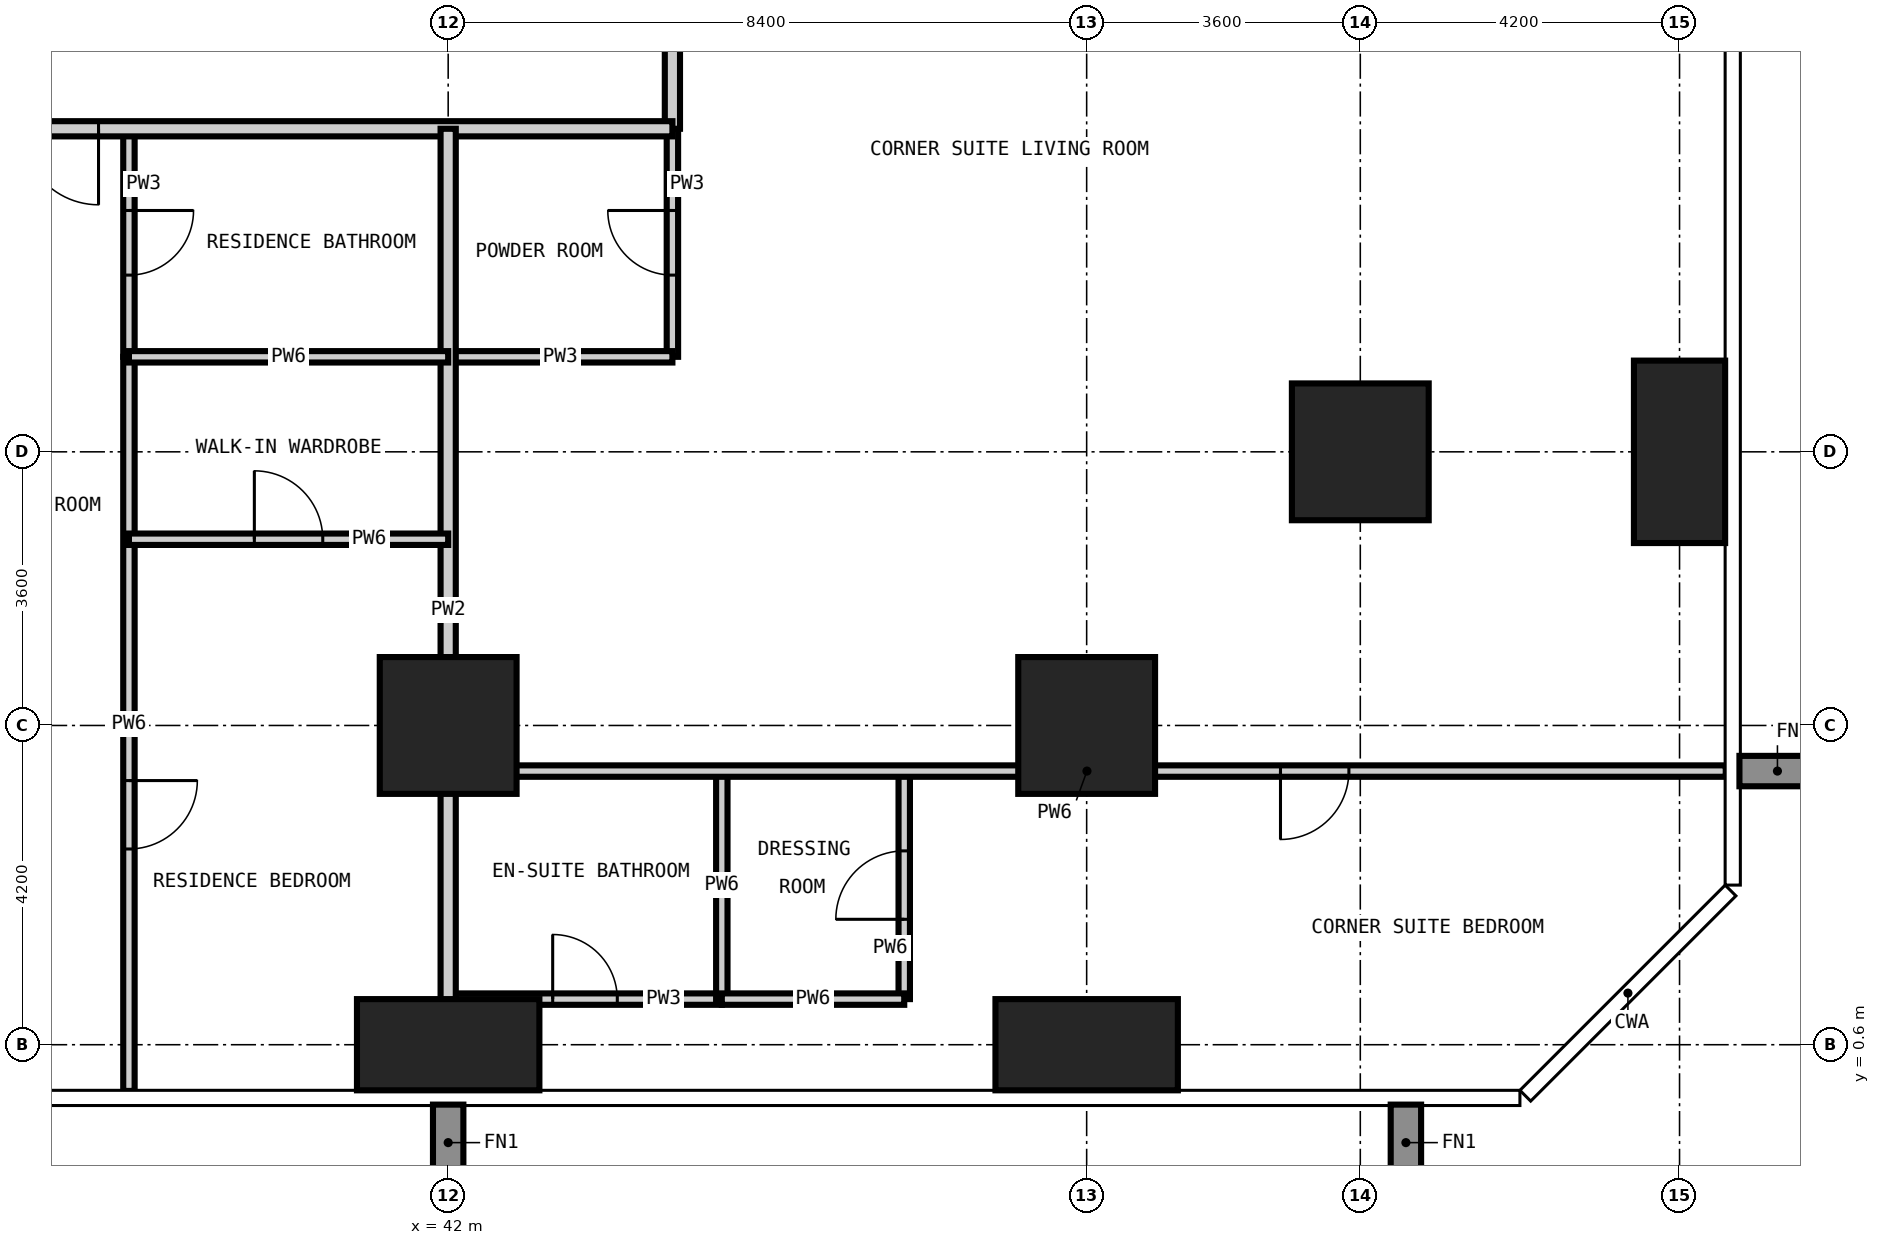
"""IFC4 building model, lengths in metres.
Left out: names, types, materials, properties, quantities, classifications, styles, units other than length and angle.
Written with IfcOpenShell. Run it as: python <this file> out.ifc"""

import sys

from ifc_helpers import new_model, si_unit, direction, frame, frame_2d, origin, origin_2d, place, context, subcontext, project, spatial, rectangle, extrude, element, fill, save


model = new_model("IFC4")
c1 = context("Model", 3, precision=1e-05, world=origin(), true_north=direction((0.0, 1.0)))
c2 = subcontext(c1, "Body", "Model", "MODEL_VIEW")
j1 = project(units=[si_unit("LENGTHUNIT", "METRE"), si_unit("PLANEANGLEUNIT", "RADIAN")], contexts=[c1])
p1 = place(None, origin())
s1 = spatial("IfcSite", under=j1, at=p1, CompositionType="ELEMENT")
p2 = place(p1, origin())
s2 = spatial("IfcBuilding", under=s1, at=p2, CompositionType="ELEMENT")
p3 = place(p2, frame((0.0, 0.0, 52.2)))
s3 = spatial("IfcBuildingStorey", under=s2, at=p3, CompositionType="ELEMENT", Elevation=52.2)
p4 = place(p3, frame((42.0, 0.6, -0.35), z_axis=(0.0, 0.0, 1.0), x_axis=(1.0, 0.0, 0.0)))
e1 = element("IfcColumn", 1, at=p4, inside=s3, PredefinedType="COLUMN", context=c2, shape_type="SweptSolid", body=[
    extrude(rectangle(XDim=2.4, YDim=1.2, at=origin_2d()), origin(), (0.0, 0.0, 1.0), 3.6),
])
p5 = place(p3, frame((42.0, 4.8, -0.35), z_axis=(0.0, 0.0, 1.0), x_axis=(1.0, 0.0, 0.0)))
e2 = element("IfcColumn", 2, at=p5, inside=s3, PredefinedType="COLUMN", context=c2, shape_type="SweptSolid", body=[
    extrude(rectangle(XDim=1.8, YDim=1.8, at=origin_2d()), origin(), (0.0, 0.0, 1.0), 3.6),
])
p6 = place(p3, frame((50.4, 0.6, -0.35), z_axis=(0.0, 0.0, 1.0), x_axis=(1.0, 0.0, 0.0)))
e3 = element("IfcColumn", 3, at=p6, inside=s3, PredefinedType="COLUMN", context=c2, shape_type="SweptSolid", body=[
    extrude(rectangle(XDim=2.4, YDim=1.2, at=origin_2d()), origin(), (0.0, 0.0, 1.0), 3.6),
])
for number, where, z_axis, x_axis in (
    (4, (50.4, 4.8, -0.35), (0.0, 0.0, 1.0), (1.0, 0.0, 0.0)),
    (5, (54.0, 8.4, -0.35), (0.0, 0.0, 1.0), (1.0, 0.0, 0.0)),
):
    element("IfcColumn", number, at=place(p3, frame(where, z_axis=z_axis, x_axis=x_axis)), inside=s3, PredefinedType="COLUMN", context=c2, shape_type="SweptSolid", body=[
        extrude(rectangle(XDim=1.8, YDim=1.8, at=origin_2d()), origin(), (0.0, 0.0, 1.0), 3.6),
    ])
p7 = place(p3, frame((58.2, 8.4, -0.35), z_axis=(0.0, 0.0, 1.0), x_axis=(1.0, 0.0, 0.0)))
e6 = element("IfcColumn", 6, at=p7, inside=s3, PredefinedType="COLUMN", context=c2, shape_type="SweptSolid", body=[
    extrude(rectangle(XDim=1.2, YDim=2.4, at=origin_2d()), origin(), (0.0, 0.0, 1.0), 3.6),
])
p8 = place(p3, frame((37.8, 9.65, 0.0), z_axis=(0.0, 0.0, 1.0), x_axis=(0.0, 1.0, 0.0)))
e7 = element("IfcWall", 7, at=p8, inside=s3, PredefinedType="PARTITIONING", context=c2, shape_type="SweptSolid", body=[
    extrude(rectangle(XDim=3.0, YDim=0.15, at=frame_2d((1.5, 0.0))), origin(), (0.0, 0.0, 1.0), 3.25),
])
p9 = place(p8, frame((1.075, 0.0, 0.0)))
e8 = element("IfcOpeningElement", 8, at=p9, cuts=e7, PredefinedType="OPENING", context=c2, shape_type="SweptSolid", body=[
    extrude(rectangle(XDim=0.85, YDim=2.1, at=frame_2d((0.425, 1.05))), frame((0.0, 0.085, 0.0), z_axis=(0.0, -1.0, 0.0), x_axis=(1.0, 0.0, 0.0)), (0.0, 0.0, 1.0), 0.17),
])
p10 = place(p3, frame((44.95, 9.65, 0.0), z_axis=(0.0, 0.0, 1.0), x_axis=(0.0, 1.0, 0.0)))
e9 = element("IfcWall", 9, at=p10, inside=s3, PredefinedType="PARTITIONING", context=c2, shape_type="SweptSolid", body=[
    extrude(rectangle(XDim=3.0, YDim=0.15, at=frame_2d((1.5, 0.0))), origin(), (0.0, 0.0, 1.0), 3.25),
])
p11 = place(p10, frame((1.075, 0.0, 0.0)))
e10 = element("IfcOpeningElement", 10, at=p11, cuts=e9, PredefinedType="OPENING", context=c2, shape_type="SweptSolid", body=[
    extrude(rectangle(XDim=0.85, YDim=2.1, at=frame_2d((0.425, 1.05))), frame((0.0, 0.085, 0.0), z_axis=(0.0, -1.0, 0.0), x_axis=(1.0, 0.0, 0.0)), (0.0, 0.0, 1.0), 0.17),
])
p12 = place(p3, frame((42.0, 1.2, 0.0), z_axis=(0.0, 0.0, 1.0), x_axis=(1.0, 0.0, 0.0)))
e11 = element("IfcWall", 11, at=p12, inside=s3, PredefinedType="PARTITIONING", context=c2, shape_type="SweptSolid", body=[
    extrude(rectangle(XDim=3.6, YDim=0.15, at=frame_2d((1.8, 0.0))), origin(), (0.0, 0.0, 1.0), 3.25),
])
p13 = place(p12, frame((1.375, 0.0, 0.0)))
e12 = element("IfcOpeningElement", 12, at=p13, cuts=e11, PredefinedType="OPENING", context=c2, shape_type="SweptSolid", body=[
    extrude(rectangle(XDim=0.85, YDim=2.1, at=frame_2d((0.425, 1.05))), frame((0.0, 0.085, 0.0), z_axis=(0.0, -1.0, 0.0), x_axis=(1.0, 0.0, 0.0)), (0.0, 0.0, 1.0), 0.17),
])
p14 = place(p3, frame((42.0, 9.65, 0.0), z_axis=(0.0, 0.0, 1.0), x_axis=(1.0, 0.0, 0.0)))
e13 = element("IfcWall", 13, at=p14, inside=s3, PredefinedType="PARTITIONING", context=c2, shape_type="SweptSolid", body=[
    extrude(rectangle(XDim=2.95, YDim=0.15, at=frame_2d((1.475, 0.0))), origin(), (0.0, 0.0, 1.0), 3.25),
])
p15 = place(p3, frame((44.95, 45.55, 0.0), z_axis=(0.0, 0.0, 1.0), x_axis=(0.0, -1.0, 0.0)))
e14 = element("IfcWall", 14, at=p15, inside=s3, PredefinedType="PARTITIONING", context=c2, shape_type="SweptSolid", body=[
    extrude(rectangle(XDim=32.9, YDim=0.2, at=frame_2d((16.45, 0.0))), origin(), (0.0, 0.0, 1.0), 3.25),
])
p16 = place(p15, frame((24.8, 0.0, 0.0)))
e15 = element("IfcOpeningElement", 15, at=p16, cuts=e14, PredefinedType="OPENING", context=c2, shape_type="SweptSolid", body=[
    extrude(rectangle(XDim=1.0, YDim=2.2, at=frame_2d((0.5, 1.1))), frame((0.0, 0.11, 0.0), z_axis=(0.0, -1.0, 0.0), x_axis=(1.0, 0.0, 0.0)), (0.0, 0.0, 1.0), 0.22),
])
p17 = place(p15, frame((19.85, 0.0, 0.0)))
e16 = element("IfcOpeningElement", 16, at=p17, cuts=e14, PredefinedType="OPENING", context=c2, shape_type="SweptSolid", body=[
    extrude(rectangle(XDim=1.0, YDim=2.2, at=frame_2d((0.5, 1.1))), frame((0.0, 0.11, 0.0), z_axis=(0.0, -1.0, 0.0), x_axis=(1.0, 0.0, 0.0)), (0.0, 0.0, 1.0), 0.22),
])
p18 = place(p15, frame((11.45, 0.0, 0.0)))
e17 = element("IfcOpeningElement", 17, at=p18, cuts=e14, PredefinedType="OPENING", context=c2, shape_type="SweptSolid", body=[
    extrude(rectangle(XDim=1.0, YDim=2.2, at=frame_2d((0.5, 1.1))), frame((0.0, 0.11, 0.0), z_axis=(0.0, -1.0, 0.0), x_axis=(1.0, 0.0, 0.0)), (0.0, 0.0, 1.0), 0.22),
])
p19 = place(p15, frame((6.5, 0.0, 0.0)))
e18 = element("IfcOpeningElement", 18, at=p19, cuts=e14, PredefinedType="OPENING", context=c2, shape_type="SweptSolid", body=[
    extrude(rectangle(XDim=1.0, YDim=2.2, at=frame_2d((0.5, 1.1))), frame((0.0, 0.11, 0.0), z_axis=(0.0, -1.0, 0.0), x_axis=(1.0, 0.0, 0.0)), (0.0, 0.0, 1.0), 0.22),
])
p20 = place(p15, frame((30.325, 0.0, 0.0)))
e19 = element("IfcOpeningElement", 19, at=p20, cuts=e14, PredefinedType="OPENING", context=c2, shape_type="SweptSolid", body=[
    extrude(rectangle(XDim=1.0, YDim=2.2, at=frame_2d((0.5, 1.1))), frame((0.0, 0.11, 0.0), z_axis=(0.0, -1.0, 0.0), x_axis=(1.0, 0.0, 0.0)), (0.0, 0.0, 1.0), 0.22),
])
p21 = place(p15, frame((1.275, 0.0, 0.0)))
e20 = element("IfcOpeningElement", 20, at=p21, cuts=e14, PredefinedType="OPENING", context=c2, shape_type="SweptSolid", body=[
    extrude(rectangle(XDim=1.0, YDim=2.2, at=frame_2d((0.5, 1.1))), frame((0.0, 0.11, 0.0), z_axis=(0.0, -1.0, 0.0), x_axis=(1.0, 0.0, 0.0)), (0.0, 0.0, 1.0), 0.22),
])
p22 = place(p3, frame((44.95, 12.65, 0.0), z_axis=(0.0, 0.0, 1.0), x_axis=(-1.0, 0.0, 0.0)))
e21 = element("IfcWall", 21, at=p22, inside=s3, PredefinedType="PARTITIONING", context=c2, shape_type="SweptSolid", body=[
    extrude(rectangle(XDim=32.3, YDim=0.2, at=frame_2d((16.15, 0.0))), origin(), (0.0, 0.0, 1.0), 3.25),
])
p23 = place(p22, frame((24.35, 0.0, 0.0)))
e22 = element("IfcOpeningElement", 22, at=p23, cuts=e21, PredefinedType="OPENING", context=c2, shape_type="SweptSolid", body=[
    extrude(rectangle(XDim=1.0, YDim=2.2, at=frame_2d((0.5, 1.1))), frame((0.0, 0.11, 0.0), z_axis=(0.0, -1.0, 0.0), x_axis=(1.0, 0.0, 0.0)), (0.0, 0.0, 1.0), 0.22),
])
p24 = place(p22, frame((15.95, 0.0, 0.0)))
e23 = element("IfcOpeningElement", 23, at=p24, cuts=e21, PredefinedType="OPENING", context=c2, shape_type="SweptSolid", body=[
    extrude(rectangle(XDim=1.0, YDim=2.2, at=frame_2d((0.5, 1.1))), frame((0.0, 0.11, 0.0), z_axis=(0.0, -1.0, 0.0), x_axis=(1.0, 0.0, 0.0)), (0.0, 0.0, 1.0), 0.22),
])
p25 = place(p22, frame((7.55, 0.0, 0.0)))
e24 = element("IfcOpeningElement", 24, at=p25, cuts=e21, PredefinedType="OPENING", context=c2, shape_type="SweptSolid", body=[
    extrude(rectangle(XDim=1.0, YDim=2.2, at=frame_2d((0.5, 1.1))), frame((0.0, 0.11, 0.0), z_axis=(0.0, -1.0, 0.0), x_axis=(1.0, 0.0, 0.0)), (0.0, 0.0, 1.0), 0.22),
])
p26 = place(p3, frame((42.0, -0.008, 0.0), z_axis=(0.0, 0.0, 1.0), x_axis=(0.0, 1.0, 0.0)))
e25 = element("IfcWall", 25, at=p26, inside=s3, PredefinedType="PARTITIONING", context=c2, shape_type="SweptSolid", body=[
    extrude(rectangle(XDim=12.658, YDim=0.2, at=frame_2d((6.329, 0.0))), origin(), (0.0, 0.0, 1.0), 3.25),
])
p27 = place(p3, frame((37.8, -0.008, 0.0), z_axis=(0.0, 0.0, 1.0), x_axis=(0.0, 1.0, 0.0)))
e26 = element("IfcWall", 26, at=p27, inside=s3, PredefinedType="PARTITIONING", context=c2, shape_type="SweptSolid", body=[
    extrude(rectangle(XDim=9.658, YDim=0.15, at=frame_2d((4.829, 0.0))), origin(), (0.0, 0.0, 1.0), 3.25),
])
p28 = place(p27, frame((3.183, 0.0, 0.0)))
e27 = element("IfcOpeningElement", 27, at=p28, cuts=e26, PredefinedType="OPENING", context=c2, shape_type="SweptSolid", body=[
    extrude(rectangle(XDim=0.9, YDim=2.1, at=frame_2d((0.45, 1.05))), frame((0.0, 0.085, 0.0), z_axis=(0.0, -1.0, 0.0), x_axis=(1.0, 0.0, 0.0)), (0.0, 0.0, 1.0), 0.17),
])
p29 = place(p3, frame((45.6, 1.2, 0.0), z_axis=(0.0, 0.0, 1.0), x_axis=(0.0, 1.0, 0.0)))
e28 = element("IfcWall", 28, at=p29, inside=s3, PredefinedType="PARTITIONING", context=c2, shape_type="SweptSolid", body=[
    extrude(rectangle(XDim=3.0, YDim=0.15, at=frame_2d((1.5, 0.0))), origin(), (0.0, 0.0, 1.0), 3.25),
])
p30 = place(p3, frame((48.0, 1.2, 0.0), z_axis=(0.0, 0.0, 1.0), x_axis=(0.0, 1.0, 0.0)))
e29 = element("IfcWall", 29, at=p30, inside=s3, PredefinedType="PARTITIONING", context=c2, shape_type="SweptSolid", body=[
    extrude(rectangle(XDim=3.0, YDim=0.15, at=frame_2d((1.5, 0.0))), origin(), (0.0, 0.0, 1.0), 3.25),
])
p31 = place(p30, frame((1.05, 0.0, 0.0)))
e30 = element("IfcOpeningElement", 30, at=p31, cuts=e29, PredefinedType="OPENING", context=c2, shape_type="SweptSolid", body=[
    extrude(rectangle(XDim=0.9, YDim=2.1, at=frame_2d((0.45, 1.05))), frame((0.0, 0.085, 0.0), z_axis=(0.0, -1.0, 0.0), x_axis=(1.0, 0.0, 0.0)), (0.0, 0.0, 1.0), 0.17),
])
p32 = place(p3, frame((45.6, 1.2, 0.0), z_axis=(0.0, 0.0, 1.0), x_axis=(1.0, 0.0, 0.0)))
e31 = element("IfcWall", 31, at=p32, inside=s3, PredefinedType="PARTITIONING", context=c2, shape_type="SweptSolid", body=[
    extrude(rectangle(XDim=2.4, YDim=0.15, at=frame_2d((1.2, 0.0))), origin(), (0.0, 0.0, 1.0), 3.25),
])
p33 = place(p3, frame((42.0, 4.2, 0.0), z_axis=(0.0, 0.0, 1.0), x_axis=(1.0, 0.0, 0.0)))
e32 = element("IfcWall", 32, at=p33, inside=s3, PredefinedType="PARTITIONING", context=c2, shape_type="SweptSolid", body=[
    extrude(rectangle(XDim=16.808, YDim=0.15, at=frame_2d((8.404, 0.0))), origin(), (0.0, 0.0, 1.0), 3.25),
])
p34 = place(p33, frame((10.95, 0.0, 0.0)))
e33 = element("IfcOpeningElement", 33, at=p34, cuts=e32, PredefinedType="OPENING", context=c2, shape_type="SweptSolid", body=[
    extrude(rectangle(XDim=0.9, YDim=2.1, at=frame_2d((0.45, 1.05))), frame((0.0, 0.085, 0.0), z_axis=(0.0, -1.0, 0.0), x_axis=(1.0, 0.0, 0.0)), (0.0, 0.0, 1.0), 0.17),
])
p35 = place(p3, frame((37.8, 7.25, 0.0), z_axis=(0.0, 0.0, 1.0), x_axis=(1.0, 0.0, 0.0)))
e34 = element("IfcWall", 34, at=p35, inside=s3, PredefinedType="PARTITIONING", context=c2, shape_type="SweptSolid", body=[
    extrude(rectangle(XDim=4.2, YDim=0.15, at=frame_2d((2.1, 0.0))), origin(), (0.0, 0.0, 1.0), 3.25),
])
p36 = place(p35, frame((1.65, 0.0, 0.0)))
e35 = element("IfcOpeningElement", 35, at=p36, cuts=e34, PredefinedType="OPENING", context=c2, shape_type="SweptSolid", body=[
    extrude(rectangle(XDim=0.9, YDim=2.1, at=frame_2d((0.45, 1.05))), frame((0.0, 0.085, 0.0), z_axis=(0.0, -1.0, 0.0), x_axis=(1.0, 0.0, 0.0)), (0.0, 0.0, 1.0), 0.17),
])
p37 = place(p3, frame((37.8, 9.65, 0.0), z_axis=(0.0, 0.0, 1.0), x_axis=(1.0, 0.0, 0.0)))
e36 = element("IfcWall", 36, at=p37, inside=s3, PredefinedType="PARTITIONING", context=c2, shape_type="SweptSolid", body=[
    extrude(rectangle(XDim=4.2, YDim=0.15, at=frame_2d((2.1, 0.0))), origin(), (0.0, 0.0, 1.0), 3.25),
])
p38 = place(p25, origin())
e37 = element("IfcDoor", 37, at=p38, inside=s3, OperationType="SINGLE_SWING_LEFT", PredefinedType="DOOR", context=c2, shape_type="SweptSolid", body=[
    extrude(rectangle(XDim=1.0, YDim=2.2, at=frame_2d((0.5, 1.1))), frame((0.0, 0.025, 0.0), z_axis=(0.0, -1.0, 0.0), x_axis=(1.0, 0.0, 0.0)), (0.0, 0.0, 1.0), 0.05),
])
fill(e24, e37)
p39 = place(p9, frame((0.85, 0.0, 0.0), z_axis=(0.0, 0.0, 1.0), x_axis=(-1.0, 0.0, 0.0)))
e38 = element("IfcDoor", 38, at=p39, inside=s3, OperationType="SINGLE_SWING_LEFT", PredefinedType="DOOR", context=c2, shape_type="SweptSolid", body=[
    extrude(rectangle(XDim=0.85, YDim=2.1, at=frame_2d((0.425, 1.05))), frame((0.0, 0.025, 0.0), z_axis=(0.0, -1.0, 0.0), x_axis=(1.0, 0.0, 0.0)), (0.0, 0.0, 1.0), 0.05),
])
fill(e8, e38)
p40 = place(p36, origin())
e39 = element("IfcDoor", 39, at=p40, inside=s3, OperationType="SINGLE_SWING_LEFT", PredefinedType="DOOR", context=c2, shape_type="SweptSolid", body=[
    extrude(rectangle(XDim=0.9, YDim=2.1, at=frame_2d((0.45, 1.05))), frame((0.0, 0.025, 0.0), z_axis=(0.0, -1.0, 0.0), x_axis=(1.0, 0.0, 0.0)), (0.0, 0.0, 1.0), 0.05),
])
fill(e35, e39)
p41 = place(p28, frame((0.9, 0.0, 0.0), z_axis=(0.0, 0.0, 1.0), x_axis=(-1.0, 0.0, 0.0)))
e40 = element("IfcDoor", 40, at=p41, inside=s3, OperationType="SINGLE_SWING_LEFT", PredefinedType="DOOR", context=c2, shape_type="SweptSolid", body=[
    extrude(rectangle(XDim=0.9, YDim=2.1, at=frame_2d((0.45, 1.05))), frame((0.0, 0.025, 0.0), z_axis=(0.0, -1.0, 0.0), x_axis=(1.0, 0.0, 0.0)), (0.0, 0.0, 1.0), 0.05),
])
fill(e27, e40)
p42 = place(p11, origin())
e41 = element("IfcDoor", 41, at=p42, inside=s3, OperationType="SINGLE_SWING_RIGHT", PredefinedType="DOOR", context=c2, shape_type="SweptSolid", body=[
    extrude(rectangle(XDim=0.85, YDim=2.1, at=frame_2d((0.425, 1.05))), frame((0.0, 0.025, 0.0), z_axis=(0.0, -1.0, 0.0), x_axis=(1.0, 0.0, 0.0)), (0.0, 0.0, 1.0), 0.05),
])
fill(e10, e41)
p43 = place(p34, frame((0.9, 0.0, 0.0), z_axis=(0.0, 0.0, 1.0), x_axis=(-1.0, 0.0, 0.0)))
e42 = element("IfcDoor", 42, at=p43, inside=s3, OperationType="SINGLE_SWING_RIGHT", PredefinedType="DOOR", context=c2, shape_type="SweptSolid", body=[
    extrude(rectangle(XDim=0.9, YDim=2.1, at=frame_2d((0.45, 1.05))), frame((0.0, 0.025, 0.0), z_axis=(0.0, -1.0, 0.0), x_axis=(1.0, 0.0, 0.0)), (0.0, 0.0, 1.0), 0.05),
])
fill(e33, e42)
p44 = place(p13, origin())
e43 = element("IfcDoor", 43, at=p44, inside=s3, OperationType="SINGLE_SWING_LEFT", PredefinedType="DOOR", context=c2, shape_type="SweptSolid", body=[
    extrude(rectangle(XDim=0.85, YDim=2.1, at=frame_2d((0.425, 1.05))), frame((0.0, 0.025, 0.0), z_axis=(0.0, -1.0, 0.0), x_axis=(1.0, 0.0, 0.0)), (0.0, 0.0, 1.0), 0.05),
])
fill(e12, e43)
p45 = place(p31, origin())
e44 = element("IfcDoor", 44, at=p45, inside=s3, OperationType="SINGLE_SWING_LEFT", PredefinedType="DOOR", context=c2, shape_type="SweptSolid", body=[
    extrude(rectangle(XDim=0.9, YDim=2.1, at=frame_2d((0.45, 1.05))), frame((0.0, 0.025, 0.0), z_axis=(0.0, -1.0, 0.0), x_axis=(1.0, 0.0, 0.0)), (0.0, 0.0, 1.0), 0.05),
])
fill(e30, e44)
save(model, sys.argv[1])
